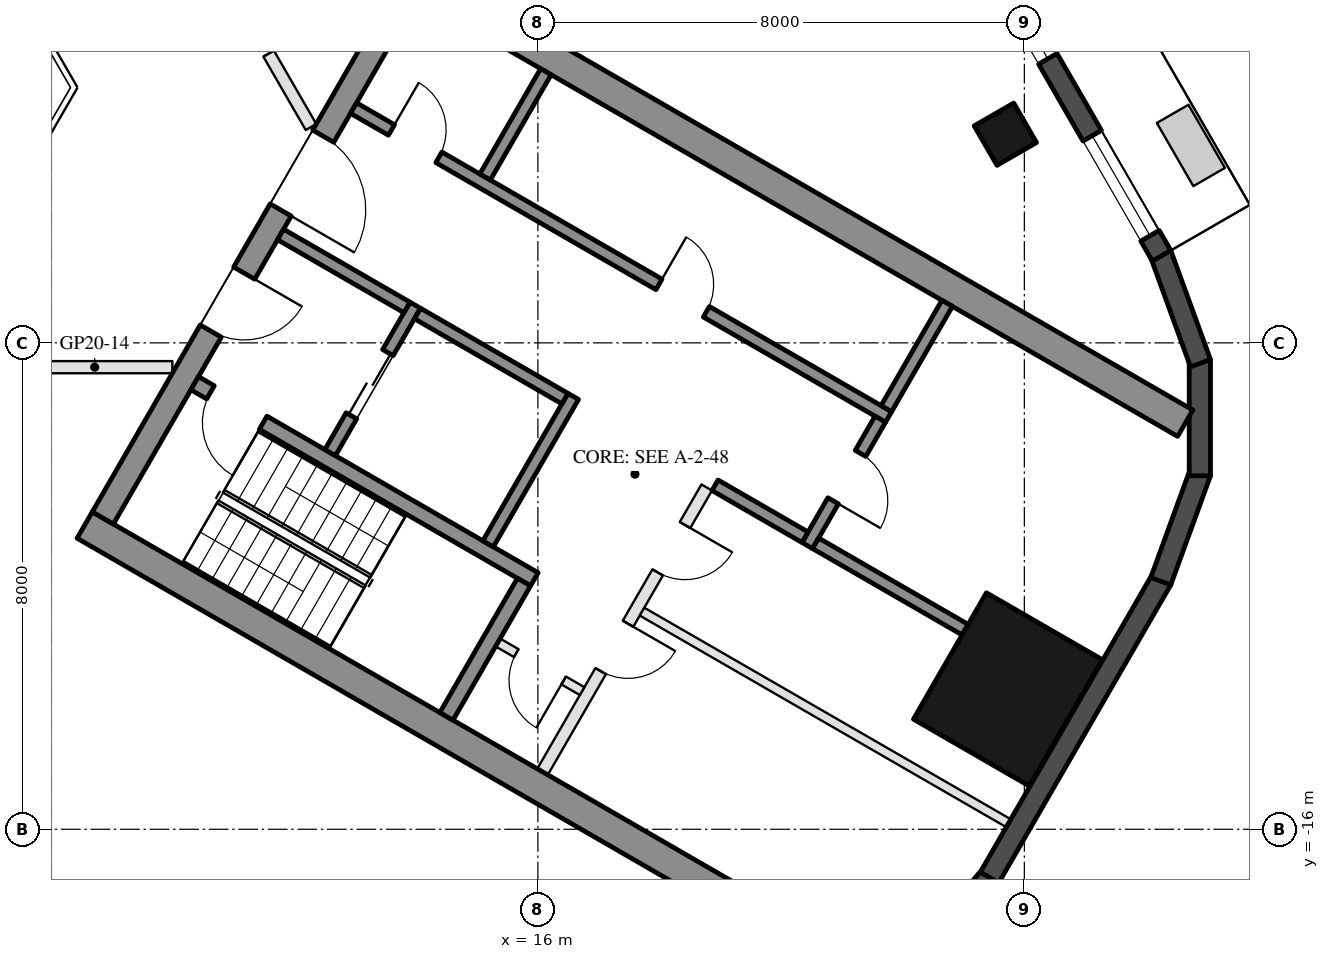
"""IFC4 building model, lengths in metres.
Left out: names, types, materials, properties, quantities, classifications, styles, units other than length and angle.
Written with IfcOpenShell. Run it as: python <this file> out.ifc"""

import sys

from ifc_helpers import new_model, si_unit, direction, frame, frame_2d, origin, origin_2d, place, context, subcontext, project, spatial, rectangle, hollow_rectangle, extrude, element, fill, save


model = new_model("IFC4")
c1 = context("Model", 3, precision=1e-05, world=origin(), true_north=direction((0.0, 1.0)))
c2 = subcontext(c1, "Body", "Model", "MODEL_VIEW")
j1 = project(units=[si_unit("LENGTHUNIT", "METRE"), si_unit("PLANEANGLEUNIT", "RADIAN")], contexts=[c1])
p1 = place(None, origin())
s1 = spatial("IfcSite", under=j1, at=p1, CompositionType="ELEMENT")
p2 = place(p1, origin())
s2 = spatial("IfcBuilding", under=s1, at=p2, CompositionType="ELEMENT")
p3 = place(p2, frame((0.0, 0.0, 209.5)))
s3 = spatial("IfcBuildingStorey", under=s2, at=p3, CompositionType="ELEMENT", Elevation=209.5)
p4 = place(p3, frame((23.688, -4.568, 0.0), z_axis=(0.0, 0.0, 1.0), x_axis=(-0.5, 0.866025403784, 0.0)))
e1 = element("IfcColumn", 1, at=p4, inside=s3, PredefinedType="COLUMN", context=c2, shape_type="SweptSolid", body=[
    extrude(hollow_rectangle(XDim=0.75, YDim=0.75, WallThickness=0.035, at=origin_2d()), origin(), (0.0, 0.0, 1.0), 3.7),
])
p5 = place(p3, frame((23.729, -13.7, 0.0), z_axis=(0.0, 0.0, 1.0), x_axis=(0.5, 0.866025403784, 0.0)))
e2 = element("IfcColumn", 2, at=p5, inside=s3, PredefinedType="COLUMN", context=c2, shape_type="SweptSolid", body=[
    extrude(hollow_rectangle(XDim=2.4, YDim=2.2, WallThickness=0.06, at=origin_2d()), origin(), (0.0, 0.0, 1.0), 3.7),
])
p6 = place(p3, frame((22.217, -18.231, 0.0), z_axis=(0.0, 0.0, 1.0), x_axis=(0.642733291068, 0.76609001857, 0.0)))
e3 = element("IfcWall", 3, at=p6, inside=s3, PredefinedType="SOLIDWALL", context=c2, shape_type="SweptSolid", body=[
    extrude(rectangle(XDim=1.91, YDim=0.35, at=frame_2d((0.955, 0.0))), origin(), (0.0, 0.0, 1.0), 3.55),
])
p7 = place(p3, frame((23.427, -16.792, 0.0), z_axis=(0.0, 0.0, 1.0), x_axis=(0.500018773155, 0.866014564827, 0.0)))
e4 = element("IfcWall", 4, at=p7, inside=s3, PredefinedType="SOLIDWALL", context=c2, shape_type="SweptSolid", body=[
    extrude(rectangle(XDim=5.658, YDim=0.35, at=frame_2d((2.829, 0.0))), origin(), (0.0, 0.0, 1.0), 3.55),
])
for number, where, z_axis, x_axis in (
    (5, (26.244, -11.92, 0.0), (0.0, 0.0, 1.0), (0.342, 0.94, 0.0)),
    (6, (26.886, -10.185, 0.0), (0.0, 0.0, 1.0), (0.0, 1.0, 0.0)),
    (7, (26.897, -8.335, 0.0), (0.0, 0.0, 1.0), (-0.342, 0.94, 0.0)),
):
    element("IfcWall", number, at=place(p3, frame(where, z_axis=z_axis, x_axis=x_axis)), inside=s3, PredefinedType="SOLIDWALL", context=c2, shape_type="SweptSolid", body=[
        extrude(rectangle(XDim=1.91, YDim=0.35, at=frame_2d((0.955, 0.0))), origin(), (0.0, 0.0, 1.0), 3.55),
    ])
p8 = place(p3, frame((26.257, -6.567, 0.0), z_axis=(0.0, 0.0, 1.0), x_axis=(-0.500023526245, 0.866011820475, 0.0)))
e8 = element("IfcWall", 8, at=p8, inside=s3, PredefinedType="SOLIDWALL", context=c2, shape_type="SweptSolid", body=[
    extrude(rectangle(XDim=11.816, YDim=0.35, at=frame_2d((5.908, 0.0))), origin(), (0.0, 0.0, 1.0), 3.55),
])
p9 = place(p8, frame((0.38, 0.0, 0.3)))
e9 = element("IfcOpeningElement", 9, at=p9, cuts=e8, PredefinedType="OPENING", context=c2, shape_type="SweptSolid", body=[
    extrude(rectangle(XDim=1.9, YDim=2.65, at=frame_2d((0.95, 1.325))), frame((0.0, 0.185, 0.0), z_axis=(0.0, -1.0, 0.0), x_axis=(1.0, 0.0, 0.0)), (0.0, 0.0, 1.0), 0.37),
])
p10 = place(p8, frame((7.791, 0.0, 0.0)))
e10 = element("IfcOpeningElement", 10, at=p10, cuts=e8, PredefinedType="OPENING", context=c2, shape_type="SweptSolid", body=[
    extrude(rectangle(XDim=2.4, YDim=2.4, at=frame_2d((1.2, 1.2))), frame((0.0, 0.185, 0.0), z_axis=(0.0, -1.0, 0.0), x_axis=(1.0, 0.0, 0.0)), (0.0, 0.0, 1.0), 0.37),
])
p11 = place(p8, frame((3.741, 0.0, 0.3)))
e11 = element("IfcOpeningElement", 11, at=p11, cuts=e8, PredefinedType="OPENING", context=c2, shape_type="SweptSolid", body=[
    extrude(rectangle(XDim=1.7, YDim=2.65, at=frame_2d((0.85, 1.325))), frame((0.0, 0.185, 0.0), z_axis=(0.0, -1.0, 0.0), x_axis=(1.0, 0.0, 0.0)), (0.0, 0.0, 1.0), 0.37),
])
p12 = place(p8, frame((5.741, 0.0, 0.3)))
e12 = element("IfcOpeningElement", 12, at=p12, cuts=e8, PredefinedType="OPENING", context=c2, shape_type="SweptSolid", body=[
    extrude(rectangle(XDim=1.7, YDim=2.65, at=frame_2d((0.85, 1.325))), frame((0.0, 0.185, 0.0), z_axis=(0.0, -1.0, 0.0), x_axis=(1.0, 0.0, 0.0)), (0.0, 0.0, 1.0), 0.37),
])
for number, where, z_axis, x_axis in (
    (13, (8.547, -10.997, 0.0), (0.0, 0.0, 1.0), (0.866, -0.5, 0.0)),
    (14, (13.797, -1.903, 0.0), (0.0, 0.0, 1.0), (0.866, -0.5, 0.0)),
):
    element("IfcWall", number, at=place(p3, frame(where, z_axis=z_axis, x_axis=x_axis)), inside=s3, PredefinedType="SHEAR", context=c2, shape_type="SweptSolid", body=[
        extrude(rectangle(XDim=14.837, YDim=0.5, at=frame_2d((7.418, 0.0))), origin(), (0.0, 0.0, 1.0), 3.5),
    ])
p13 = place(p3, frame((8.845, -10.88, 0.0), z_axis=(0.0, 0.0, 1.0), x_axis=(0.500004234368, 0.866022959057, 0.0)))
e15 = element("IfcWall", 15, at=p13, inside=s3, PredefinedType="SHEAR", context=c2, shape_type="SweptSolid", body=[
    extrude(rectangle(XDim=10.0, YDim=0.4, at=frame_2d((5.0, 0.0))), origin(), (0.0, 0.0, 1.0), 3.5),
])
p14 = place(p13, frame((3.55, 0.0, 0.0)))
e16 = element("IfcOpeningElement", 16, at=p14, cuts=e15, PredefinedType="OPENING", context=c2, shape_type="SweptSolid", body=[
    extrude(rectangle(XDim=1.1, YDim=2.1, at=frame_2d((0.55, 1.05))), frame((0.0, 0.21, 0.0), z_axis=(0.0, -1.0, 0.0), x_axis=(1.0, 0.0, 0.0)), (0.0, 0.0, 1.0), 0.42),
])
p15 = place(p13, frame((5.85, 0.0, 0.0)))
e17 = element("IfcOpeningElement", 17, at=p15, cuts=e15, PredefinedType="OPENING", context=c2, shape_type="SweptSolid", body=[
    extrude(rectangle(XDim=1.4, YDim=2.1, at=frame_2d((0.7, 1.05))), frame((0.0, 0.21, 0.0), z_axis=(0.0, -1.0, 0.0), x_axis=(1.0, 0.0, 0.0)), (0.0, 0.0, 1.0), 0.42),
])
p16 = place(p3, frame((10.356, -8.664, 0.0), z_axis=(0.0, 0.0, 1.0), x_axis=(0.866028629588, -0.499994412703, 0.0)))
e18 = element("IfcWall", 18, at=p16, inside=s3, PredefinedType="SHEAR", context=c2, shape_type="SweptSolid", body=[
    extrude(rectangle(XDim=6.45, YDim=0.25, at=frame_2d((3.225, 0.0))), origin(), (0.0, 0.0, 1.0), 3.5),
])
p17 = place(p16, frame((0.3, 0.0, 0.0)))
e19 = element("IfcOpeningElement", 19, at=p17, cuts=e18, PredefinedType="OPENING", context=c2, shape_type="SweptSolid", body=[
    extrude(rectangle(XDim=1.0, YDim=2.1, at=frame_2d((0.5, 1.05))), frame((0.0, 0.135, 0.0), z_axis=(0.0, -1.0, 0.0), x_axis=(1.0, 0.0, 0.0)), (0.0, 0.0, 1.0), 0.27),
])
p18 = place(p3, frame((14.496, -14.143, 0.0), z_axis=(0.0, 0.0, 1.0), x_axis=(0.500062241894, 0.865989465428, 0.0)))
e20 = element("IfcWall", 20, at=p18, inside=s3, PredefinedType="SHEAR", context=c2, shape_type="SweptSolid", body=[
    extrude(rectangle(XDim=2.55, YDim=0.25, at=frame_2d((1.275, 0.0))), origin(), (0.0, 0.0, 1.0), 3.5),
])
p19 = place(p3, frame((15.181, -11.305, 0.0), z_axis=(0.0, 0.0, 1.0), x_axis=(0.49994636267, 0.866056369097, 0.0)))
e21 = element("IfcWall", 21, at=p19, inside=s3, PredefinedType="SHEAR", context=c2, shape_type="SweptSolid", body=[
    extrude(rectangle(XDim=2.8, YDim=0.2, at=frame_2d((1.4, 0.0))), origin(), (0.0, 0.0, 1.0), 3.5),
])
p20 = place(p3, frame((12.583, -9.805, 0.0), z_axis=(0.0, 0.0, 1.0), x_axis=(0.49994636267, 0.866056369097, 0.0)))
e22 = element("IfcWall", 22, at=p20, inside=s3, PredefinedType="SHEAR", context=c2, shape_type="SweptSolid", body=[
    extrude(rectangle(XDim=2.8, YDim=0.2, at=frame_2d((1.4, 0.0))), origin(), (0.0, 0.0, 1.0), 3.5),
])
p21 = place(p20, frame((0.7, 0.0, 0.0)))
e23 = element("IfcOpeningElement", 23, at=p21, cuts=e22, PredefinedType="OPENING", context=c2, shape_type="SweptSolid", body=[
    extrude(rectangle(XDim=1.2, YDim=2.1, at=frame_2d((0.6, 1.05))), frame((0.0, 0.11, 0.0), z_axis=(0.0, -1.0, 0.0), x_axis=(1.0, 0.0, 0.0)), (0.0, 0.0, 1.0), 0.22),
])
p22 = place(p3, frame((11.768, -6.217, 0.0), z_axis=(0.0, 0.0, 1.0), x_axis=(0.866050077142, -0.499957262057, 0.0)))
e24 = element("IfcWall", 24, at=p22, inside=s3, PredefinedType="SHEAR", context=c2, shape_type="SweptSolid", body=[
    extrude(rectangle(XDim=2.4, YDim=0.2, at=frame_2d((1.2, 0.0))), origin(), (0.0, 0.0, 1.0), 3.5),
])
p23 = place(p3, frame((14.02, -7.517, 0.0), z_axis=(0.0, 0.0, 1.0), x_axis=(0.866034573852, -0.49998411664, 0.0)))
e25 = element("IfcWall", 25, at=p23, inside=s3, PredefinedType="SHEAR", context=c2, shape_type="SweptSolid", body=[
    extrude(rectangle(XDim=2.8, YDim=0.2, at=frame_2d((1.4, 0.0))), origin(), (0.0, 0.0, 1.0), 3.5),
])
p24 = place(p3, frame((12.968, -4.138, 0.0), z_axis=(0.0, 0.0, 1.0), x_axis=(0.866028328073, -0.49999493495, 0.0)))
e26 = element("IfcWall", 26, at=p24, inside=s3, PredefinedType="SHEAR", context=c2, shape_type="SweptSolid", body=[
    extrude(rectangle(XDim=10.16, YDim=0.2, at=frame_2d((5.08, 0.0))), origin(), (0.0, 0.0, 1.0), 3.5),
])
p25 = place(p24, frame((0.72, 0.0, 0.0)))
e27 = element("IfcOpeningElement", 27, at=p25, cuts=e26, PredefinedType="OPENING", context=c2, shape_type="SweptSolid", body=[
    extrude(rectangle(XDim=0.9, YDim=2.1, at=frame_2d((0.45, 1.05))), frame((0.0, 0.11, 0.0), z_axis=(0.0, -1.0, 0.0), x_axis=(1.0, 0.0, 0.0)), (0.0, 0.0, 1.0), 0.22),
])
p26 = place(p24, frame((5.8, 0.0, 0.0)))
e28 = element("IfcOpeningElement", 28, at=p26, cuts=e26, PredefinedType="OPENING", context=c2, shape_type="SweptSolid", body=[
    extrude(rectangle(XDim=0.9, YDim=2.1, at=frame_2d((0.45, 1.05))), frame((0.0, 0.11, 0.0), z_axis=(0.0, -1.0, 0.0), x_axis=(1.0, 0.0, 0.0)), (0.0, 0.0, 1.0), 0.22),
])
p27 = place(p3, frame((20.43, -11.333, 0.0), z_axis=(0.0, 0.0, 1.0), x_axis=(0.500001309137, 0.866024647952, 0.0)))
e29 = element("IfcWall", 29, at=p27, inside=s3, PredefinedType="SHEAR", context=c2, shape_type="SweptSolid", body=[
    extrude(rectangle(XDim=2.4, YDim=0.2, at=frame_2d((1.2, 0.0))), origin(), (0.0, 0.0, 1.0), 3.5),
])
p28 = place(p27, frame((0.85, 0.0, 0.0)))
e30 = element("IfcOpeningElement", 30, at=p28, cuts=e29, PredefinedType="OPENING", context=c2, shape_type="SweptSolid", body=[
    extrude(rectangle(XDim=0.9, YDim=2.1, at=frame_2d((0.45, 1.05))), frame((0.0, 0.11, 0.0), z_axis=(0.0, -1.0, 0.0), x_axis=(1.0, 0.0, 0.0)), (0.0, 0.0, 1.0), 0.22),
])
p29 = place(p3, frame((18.913, -10.342, 0.0), z_axis=(0.0, 0.0, 1.0), x_axis=(0.866038183914, -0.499977863513, 0.0)))
e31 = element("IfcWall", 31, at=p29, inside=s3, PredefinedType="SHEAR", context=c2, shape_type="SweptSolid", body=[
    extrude(rectangle(XDim=1.71, YDim=0.2, at=frame_2d((0.855, 0.0))), origin(), (0.0, 0.0, 1.0), 3.5),
])
for number, where, z_axis, x_axis in (
    (32, (15.131, -5.272, 0.0), (0.0, 0.0, 1.0), (0.5, 0.866, 0.0)),
    (33, (21.73, -9.082, 0.0), (0.0, 0.0, 1.0), (0.5, 0.866, 0.0)),
):
    element("IfcWall", number, at=place(p3, frame(where, z_axis=z_axis, x_axis=x_axis)), inside=s3, PredefinedType="SHEAR", context=c2, shape_type="SweptSolid", body=[
        extrude(rectangle(XDim=2.0, YDim=0.2, at=frame_2d((1.0, 0.0))), origin(), (0.0, 0.0, 1.0), 3.5),
    ])
p30 = place(p3, frame((20.567, -11.297, 0.0), z_axis=(0.0, 0.0, 1.0), x_axis=(0.866055327414, -0.49994816717, 0.0)))
e34 = element("IfcWall", 34, at=p30, inside=s3, PredefinedType="SHEAR", context=c2, shape_type="SweptSolid", body=[
    extrude(rectangle(XDim=2.84, YDim=0.2, at=frame_2d((1.42, 0.0))), origin(), (0.0, 0.0, 1.0), 3.5),
])
p31 = place(p3, frame((16.076, -15.055, 0.0), z_axis=(0.0, 0.0, 1.0), x_axis=(0.499995103361, 0.866028230842, 0.0)))
e35 = element("IfcWall", 35, at=p31, inside=s3, PredefinedType="PARTITIONING", context=c2, shape_type="SweptSolid", body=[
    extrude(rectangle(XDim=5.4, YDim=0.2, at=frame_2d((2.7, 0.0))), origin(), (0.0, 0.0, 1.0), 3.5),
])
p32 = place(p31, frame((1.913, 0.0, 0.0)))
e36 = element("IfcOpeningElement", 36, at=p32, cuts=e35, PredefinedType="OPENING", context=c2, shape_type="SweptSolid", body=[
    extrude(rectangle(XDim=0.9, YDim=2.1, at=frame_2d((0.45, 1.05))), frame((0.0, 0.11, 0.0), z_axis=(0.0, -1.0, 0.0), x_axis=(1.0, 0.0, 0.0)), (0.0, 0.0, 1.0), 0.22),
])
p33 = place(p31, frame((3.788, 0.0, 0.0)))
e37 = element("IfcOpeningElement", 37, at=p33, cuts=e35, PredefinedType="OPENING", context=c2, shape_type="SweptSolid", body=[
    extrude(rectangle(XDim=0.9, YDim=2.1, at=frame_2d((0.45, 1.05))), frame((0.0, 0.11, 0.0), z_axis=(0.0, -1.0, 0.0), x_axis=(1.0, 0.0, 0.0)), (0.0, 0.0, 1.0), 0.22),
])
p34 = place(p3, frame((15.342, -12.928, 0.0), z_axis=(0.0, 0.0, 1.0), x_axis=(0.865989903783, -0.500061482766, 0.0)))
e38 = element("IfcWall", 38, at=p34, inside=s3, PredefinedType="PARTITIONING", context=c2, shape_type="SweptSolid", body=[
    extrude(rectangle(XDim=1.6, YDim=0.15, at=frame_2d((0.8, 0.0))), origin(), (0.0, 0.0, 1.0), 3.5),
])
p35 = place(p34, frame((0.35, 0.0, 0.0)))
e39 = element("IfcOpeningElement", 39, at=p35, cuts=e38, PredefinedType="OPENING", context=c2, shape_type="SweptSolid", body=[
    extrude(rectangle(XDim=0.9, YDim=2.1, at=frame_2d((0.45, 1.05))), frame((0.0, 0.085, 0.0), z_axis=(0.0, -1.0, 0.0), x_axis=(1.0, 0.0, 0.0)), (0.0, 0.0, 1.0), 0.17),
])
p36 = place(p3, frame((17.713, -12.42, 0.0), z_axis=(0.0, 0.0, 1.0), x_axis=(0.866016523273, -0.500015381182, 0.0)))
e40 = element("IfcWall", 40, at=p36, inside=s3, PredefinedType="PARTITIONING", context=c2, shape_type="SweptSolid", body=[
    extrude(rectangle(XDim=6.95, YDim=0.15, at=frame_2d((3.475, 0.0))), origin(), (0.0, 0.0, 1.0), 3.5),
])
p37 = place(p3, frame((9.988, -8.4, 0.0), z_axis=(0.0, 0.0, 1.0), x_axis=(-1.0, 0.0, 0.0)))
e41 = element("IfcWall", 41, at=p37, inside=s3, PredefinedType="PARTITIONING", context=c2, shape_type="SweptSolid", body=[
    extrude(rectangle(XDim=6.385, YDim=0.2, at=frame_2d((3.192, 0.0))), origin(), (0.0, 0.0, 1.0), 2.95),
])
p38 = place(p37, frame((2.692, 0.0, 0.0)))
e42 = element("IfcOpeningElement", 42, at=p38, cuts=e41, PredefinedType="OPENING", context=c2, shape_type="SweptSolid", body=[
    extrude(rectangle(XDim=1.0, YDim=2.1, at=frame_2d((0.5, 1.05))), frame((0.0, 0.11, 0.0), z_axis=(0.0, -1.0, 0.0), x_axis=(1.0, 0.0, 0.0)), (0.0, 0.0, 1.0), 0.22),
])
p39 = place(p3, frame((10.375, -1.169, 0.0), z_axis=(0.0, 0.0, 1.0), x_axis=(0.500055316652, -0.865993464345, 0.0)))
e43 = element("IfcWall", 43, at=p39, inside=s3, PredefinedType="PARTITIONING", context=c2, shape_type="SweptSolid", body=[
    extrude(rectangle(XDim=3.788, YDim=0.2, at=frame_2d((1.894, 0.0))), origin(), (0.0, 0.0, 1.0), 2.95),
])
p40 = place(p39, frame((1.394, 0.0, 0.0)))
e44 = element("IfcOpeningElement", 44, at=p40, cuts=e43, PredefinedType="OPENING", context=c2, shape_type="SweptSolid", body=[
    extrude(rectangle(XDim=1.0, YDim=2.1, at=frame_2d((0.5, 1.05))), frame((0.0, 0.11, 0.0), z_axis=(0.0, -1.0, 0.0), x_axis=(1.0, 0.0, 0.0)), (0.0, 0.0, 1.0), 0.22),
])
p41 = place(p9, origin())
e45 = element("IfcWindow", 45, at=p41, inside=s3, PartitioningType="SINGLE_PANEL", PredefinedType="WINDOW", context=c2, shape_type="SweptSolid", body=[
    extrude(rectangle(XDim=1.9, YDim=2.65, at=frame_2d((0.95, 1.325))), frame((0.0, 0.03, 0.0), z_axis=(0.0, -1.0, 0.0), x_axis=(1.0, 0.0, 0.0)), (0.0, 0.0, 1.0), 0.06),
])
fill(e9, e45)
p42 = place(p11, origin())
e46 = element("IfcWindow", 46, at=p42, inside=s3, PartitioningType="SINGLE_PANEL", PredefinedType="WINDOW", context=c2, shape_type="SweptSolid", body=[
    extrude(rectangle(XDim=1.7, YDim=2.65, at=frame_2d((0.85, 1.325))), frame((0.0, 0.03, 0.0), z_axis=(0.0, -1.0, 0.0), x_axis=(1.0, 0.0, 0.0)), (0.0, 0.0, 1.0), 0.06),
])
fill(e11, e46)
p43 = place(p21, origin())
e47 = element("IfcDoor", 47, at=p43, inside=s3, OperationType="DOUBLE_DOOR_SLIDING", PredefinedType="DOOR", context=c2, shape_type="SweptSolid", body=[
    extrude(rectangle(XDim=1.2, YDim=2.1, at=frame_2d((0.6, 1.05))), frame((0.0, 0.025, 0.0), z_axis=(0.0, -1.0, 0.0), x_axis=(1.0, 0.0, 0.0)), (0.0, 0.0, 1.0), 0.05),
])
fill(e23, e47)
p44 = place(p35, frame((0.9, 0.0, 0.0), z_axis=(0.0, 0.0, 1.0), x_axis=(-1.0, 0.0, 0.0)))
e48 = element("IfcDoor", 48, at=p44, inside=s3, OperationType="SINGLE_SWING_LEFT", PredefinedType="DOOR", context=c2, shape_type="SweptSolid", body=[
    extrude(rectangle(XDim=0.9, YDim=2.1, at=frame_2d((0.45, 1.05))), frame((0.0, 0.025, 0.0), z_axis=(0.0, -1.0, 0.0), x_axis=(1.0, 0.0, 0.0)), (0.0, 0.0, 1.0), 0.05),
])
fill(e39, e48)
p45 = place(p25, origin())
e49 = element("IfcDoor", 49, at=p45, inside=s3, OperationType="SINGLE_SWING_LEFT", PredefinedType="DOOR", context=c2, shape_type="SweptSolid", body=[
    extrude(rectangle(XDim=0.9, YDim=2.1, at=frame_2d((0.45, 1.05))), frame((0.0, 0.025, 0.0), z_axis=(0.0, -1.0, 0.0), x_axis=(1.0, 0.0, 0.0)), (0.0, 0.0, 1.0), 0.05),
])
fill(e27, e49)
p46 = place(p26, origin())
e50 = element("IfcDoor", 50, at=p46, inside=s3, OperationType="SINGLE_SWING_LEFT", PredefinedType="DOOR", context=c2, shape_type="SweptSolid", body=[
    extrude(rectangle(XDim=0.9, YDim=2.1, at=frame_2d((0.45, 1.05))), frame((0.0, 0.025, 0.0), z_axis=(0.0, -1.0, 0.0), x_axis=(1.0, 0.0, 0.0)), (0.0, 0.0, 1.0), 0.05),
])
fill(e28, e50)
p47 = place(p28, frame((0.9, 0.0, 0.0), z_axis=(0.0, 0.0, 1.0), x_axis=(-1.0, 0.0, 0.0)))
e51 = element("IfcDoor", 51, at=p47, inside=s3, OperationType="SINGLE_SWING_RIGHT", PredefinedType="DOOR", context=c2, shape_type="SweptSolid", body=[
    extrude(rectangle(XDim=0.9, YDim=2.1, at=frame_2d((0.45, 1.05))), frame((0.0, 0.025, 0.0), z_axis=(0.0, -1.0, 0.0), x_axis=(1.0, 0.0, 0.0)), (0.0, 0.0, 1.0), 0.05),
])
fill(e30, e51)
p48 = place(p32, frame((0.9, 0.0, 0.0), z_axis=(0.0, 0.0, 1.0), x_axis=(-1.0, 0.0, 0.0)))
e52 = element("IfcDoor", 52, at=p48, inside=s3, OperationType="SINGLE_SWING_LEFT", PredefinedType="DOOR", context=c2, shape_type="SweptSolid", body=[
    extrude(rectangle(XDim=0.9, YDim=2.1, at=frame_2d((0.45, 1.05))), frame((0.0, 0.025, 0.0), z_axis=(0.0, -1.0, 0.0), x_axis=(1.0, 0.0, 0.0)), (0.0, 0.0, 1.0), 0.05),
])
fill(e36, e52)
p49 = place(p33, frame((0.9, 0.0, 0.0), z_axis=(0.0, 0.0, 1.0), x_axis=(-1.0, 0.0, 0.0)))
e53 = element("IfcDoor", 53, at=p49, inside=s3, OperationType="SINGLE_SWING_LEFT", PredefinedType="DOOR", context=c2, shape_type="SweptSolid", body=[
    extrude(rectangle(XDim=0.9, YDim=2.1, at=frame_2d((0.45, 1.05))), frame((0.0, 0.025, 0.0), z_axis=(0.0, -1.0, 0.0), x_axis=(1.0, 0.0, 0.0)), (0.0, 0.0, 1.0), 0.05),
])
fill(e37, e53)
p50 = place(p14, frame((1.1, 0.0, 0.0), z_axis=(0.0, 0.0, 1.0), x_axis=(-1.0, 0.0, 0.0)))
e54 = element("IfcDoor", 54, at=p50, inside=s3, OperationType="SINGLE_SWING_LEFT", PredefinedType="DOOR", context=c2, shape_type="SweptSolid", body=[
    extrude(rectangle(XDim=1.1, YDim=2.1, at=frame_2d((0.55, 1.05))), frame((0.0, 0.025, 0.0), z_axis=(0.0, -1.0, 0.0), x_axis=(1.0, 0.0, 0.0)), (0.0, 0.0, 1.0), 0.05),
])
fill(e16, e54)
p51 = place(p15, frame((1.4, 0.0, 0.0), z_axis=(0.0, 0.0, 1.0), x_axis=(-1.0, 0.0, 0.0)))
e55 = element("IfcDoor", 55, at=p51, inside=s3, OperationType="DOUBLE_DOOR_SINGLE_SWING", PredefinedType="DOOR", context=c2, shape_type="SweptSolid", body=[
    extrude(rectangle(XDim=1.4, YDim=2.1, at=frame_2d((0.7, 1.05))), frame((0.0, 0.025, 0.0), z_axis=(0.0, -1.0, 0.0), x_axis=(1.0, 0.0, 0.0)), (0.0, 0.0, 1.0), 0.05),
])
fill(e17, e55)
p52 = place(p17, frame((1.0, 0.0, 0.0), z_axis=(0.0, 0.0, 1.0), x_axis=(-1.0, 0.0, 0.0)))
e56 = element("IfcDoor", 56, at=p52, inside=s3, OperationType="SINGLE_SWING_LEFT", PredefinedType="DOOR", context=c2, shape_type="SweptSolid", body=[
    extrude(rectangle(XDim=1.0, YDim=2.1, at=frame_2d((0.5, 1.05))), frame((0.0, 0.025, 0.0), z_axis=(0.0, -1.0, 0.0), x_axis=(1.0, 0.0, 0.0)), (0.0, 0.0, 1.0), 0.05),
])
fill(e19, e56)
p53 = place(p40, origin())
e57 = element("IfcDoor", 57, at=p53, inside=s3, OperationType="SINGLE_SWING_LEFT", PredefinedType="DOOR", context=c2, shape_type="SweptSolid", body=[
    extrude(rectangle(XDim=1.0, YDim=2.1, at=frame_2d((0.5, 1.05))), frame((0.0, 0.025, 0.0), z_axis=(0.0, -1.0, 0.0), x_axis=(1.0, 0.0, 0.0)), (0.0, 0.0, 1.0), 0.05),
])
fill(e44, e57)
save(model, sys.argv[1])
